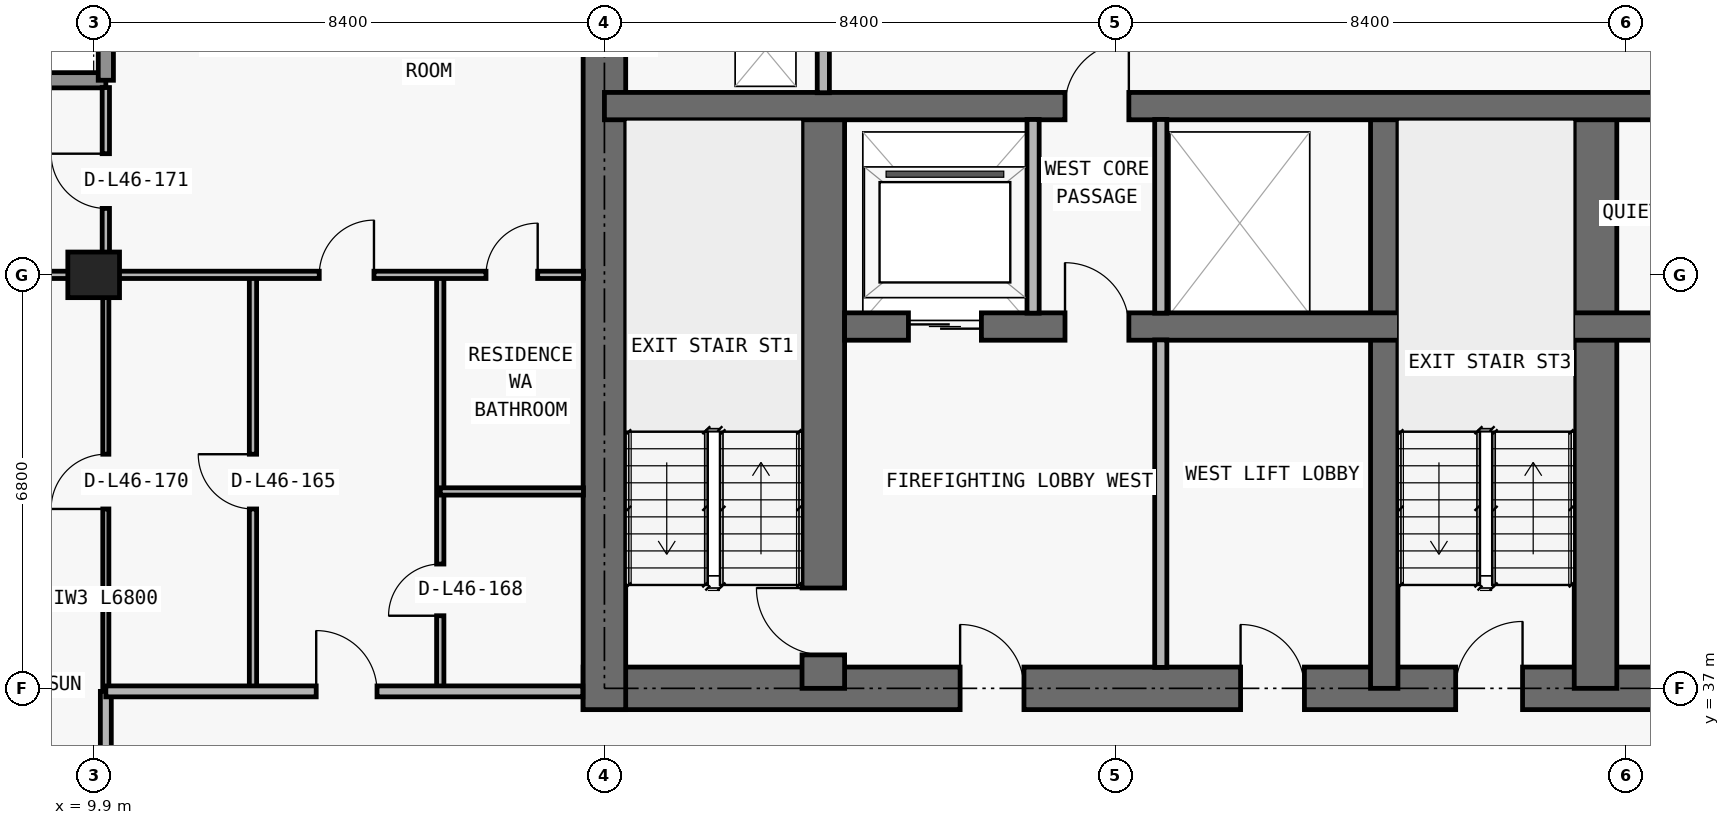
"""IFC4 building model, lengths in metres.
Left out: names, types, materials, properties, quantities, classifications, styles, units other than length and angle.
Written with IfcOpenShell. Run it as: python <this file> out.ifc"""

import sys

from ifc_helpers import new_model, si_unit, direction, frame, frame_2d, origin, origin_2d, place, context, subcontext, project, spatial, rectangle, extrude, element, fill, save


model = new_model("IFC4")
c1 = context("Model", 3, precision=1e-05, world=origin(), true_north=direction((0.0, 1.0)))
c2 = subcontext(c1, "Body", "Model", "MODEL_VIEW")
j1 = project(units=[si_unit("LENGTHUNIT", "METRE"), si_unit("PLANEANGLEUNIT", "RADIAN")], contexts=[c1])
p1 = place(None, origin())
s1 = spatial("IfcSite", under=j1, at=p1, CompositionType="ELEMENT")
p2 = place(p1, origin())
s2 = spatial("IfcBuilding", under=s1, at=p2, CompositionType="ELEMENT")
p3 = place(p2, frame((0.0, 0.0, 167.1)))
s3 = spatial("IfcBuildingStorey", under=s2, at=p3, CompositionType="ELEMENT", Elevation=167.1)
p4 = place(p3, frame((9.9, 43.8, 0.0), z_axis=(0.0, 0.0, 1.0), x_axis=(1.0, 0.0, 0.0)))
e1 = element("IfcColumn", 1, at=p4, inside=s3, PredefinedType="COLUMN", context=c2, shape_type="SweptSolid", body=[
    extrude(rectangle(XDim=0.85, YDim=0.75, at=origin_2d()), origin(), (0.0, 0.0, 1.0), 3.05),
])
p5 = place(p3, frame((17.95, 37.0, 0.0), z_axis=(0.0, 0.0, 1.0), x_axis=(1.0, 0.0, 0.0)))
e2 = element("IfcWall", 2, at=p5, inside=s3, PredefinedType="SHEAR", context=c2, shape_type="SweptSolid", body=[
    extrude(rectangle(XDim=41.9, YDim=0.7, at=frame_2d((20.95, 0.0))), origin(), (0.0, 0.0, 1.0), 3.05),
])
p6 = place(p5, frame((14.35, 0.0, 0.0)))
e3 = element("IfcOpeningElement", 3, at=p6, cuts=e2, PredefinedType="OPENING", context=c2, shape_type="SweptSolid", body=[
    extrude(rectangle(XDim=1.1, YDim=2.15, at=frame_2d((0.55, 1.075))), frame((0.0, 0.36, 0.0), z_axis=(0.0, -1.0, 0.0), x_axis=(1.0, 0.0, 0.0)), (0.0, 0.0, 1.0), 0.72),
])
p7 = place(p5, frame((6.2, 0.0, 0.0)))
e4 = element("IfcOpeningElement", 4, at=p7, cuts=e2, PredefinedType="OPENING", context=c2, shape_type="SweptSolid", body=[
    extrude(rectangle(XDim=1.05, YDim=2.15, at=frame_2d((0.525, 1.075))), frame((0.0, 0.36, 0.0), z_axis=(0.0, -1.0, 0.0), x_axis=(1.0, 0.0, 0.0)), (0.0, 0.0, 1.0), 0.72),
])
p8 = place(p5, frame((34.7, 0.0, 0.0)))
e5 = element("IfcOpeningElement", 5, at=p8, cuts=e2, PredefinedType="OPENING", context=c2, shape_type="SweptSolid", body=[
    extrude(rectangle(XDim=1.05, YDim=2.15, at=frame_2d((0.525, 1.075))), frame((0.0, 0.36, 0.0), z_axis=(0.0, -1.0, 0.0), x_axis=(1.0, 0.0, 0.0)), (0.0, 0.0, 1.0), 0.72),
])
p9 = place(p5, frame((10.812, 0.0, 0.0)))
e6 = element("IfcOpeningElement", 6, at=p9, cuts=e2, PredefinedType="OPENING", context=c2, shape_type="SweptSolid", body=[
    extrude(rectangle(XDim=1.05, YDim=2.15, at=frame_2d((0.525, 1.075))), frame((0.0, 0.36, 0.0), z_axis=(0.0, -1.0, 0.0), x_axis=(1.0, 0.0, 0.0)), (0.0, 0.0, 1.0), 0.72),
])
p10 = place(p5, frame((24.05, 0.0, 0.0)))
e7 = element("IfcOpeningElement", 7, at=p10, cuts=e2, PredefinedType="OPENING", context=c2, shape_type="SweptSolid", body=[
    extrude(rectangle(XDim=1.05, YDim=2.15, at=frame_2d((0.525, 1.075))), frame((0.0, 0.36, 0.0), z_axis=(0.0, -1.0, 0.0), x_axis=(1.0, 0.0, 0.0)), (0.0, 0.0, 1.0), 0.72),
])
p11 = place(p3, frame((18.3, 36.65, 0.0), z_axis=(0.0, 0.0, 1.0), x_axis=(0.0, 1.0, 0.0)))
e8 = element("IfcWall", 8, at=p11, inside=s3, PredefinedType="SHEAR", context=c2, shape_type="SweptSolid", body=[
    extrude(rectangle(XDim=13.95, YDim=0.7, at=frame_2d((6.975, 0.0))), origin(), (0.0, 0.0, 1.0), 3.05),
])
p12 = place(p3, frame((21.9, 37.0, 0.0), z_axis=(0.0, 0.0, 1.0), x_axis=(0.0, 1.0, 0.0)))
e9 = element("IfcWall", 9, at=p12, inside=s3, PredefinedType="SHEAR", context=c2, shape_type="SweptSolid", body=[
    extrude(rectangle(XDim=9.575, YDim=0.7, at=frame_2d((4.788, 0.0))), origin(), (0.0, 0.0, 1.0), 3.05),
])
p13 = place(p12, frame((0.55, 0.0, 0.0)))
e10 = element("IfcOpeningElement", 10, at=p13, cuts=e9, PredefinedType="OPENING", context=c2, shape_type="SweptSolid", body=[
    extrude(rectangle(XDim=1.1, YDim=2.15, at=frame_2d((0.55, 1.075))), frame((0.0, 0.36, 0.0), z_axis=(0.0, -1.0, 0.0), x_axis=(1.0, 0.0, 0.0)), (0.0, 0.0, 1.0), 0.72),
])
p14 = place(p3, frame((31.125, 37.0, 0.0), z_axis=(0.0, 0.0, 1.0), x_axis=(0.0, 1.0, 0.0)))
e11 = element("IfcWall", 11, at=p14, inside=s3, PredefinedType="SHEAR", context=c2, shape_type="SweptSolid", body=[
    extrude(rectangle(XDim=9.575, YDim=0.45, at=frame_2d((4.788, 0.0))), origin(), (0.0, 0.0, 1.0), 3.05),
])
p15 = place(p3, frame((34.6, 37.0, 0.0), z_axis=(0.0, 0.0, 1.0), x_axis=(0.0, 1.0, 0.0)))
e12 = element("IfcWall", 12, at=p15, inside=s3, PredefinedType="SHEAR", context=c2, shape_type="SweptSolid", body=[
    extrude(rectangle(XDim=9.575, YDim=0.7, at=frame_2d((4.788, 0.0))), origin(), (0.0, 0.0, 1.0), 3.05),
])
p16 = place(p3, frame((22.25, 42.95, 0.0), z_axis=(0.0, 0.0, 1.0), x_axis=(1.0, 0.0, 0.0)))
e13 = element("IfcWall", 13, at=p16, inside=s3, PredefinedType="SHEAR", context=c2, shape_type="SweptSolid", body=[
    extrude(rectangle(XDim=33.3, YDim=0.45, at=frame_2d((16.65, 0.0))), origin(), (0.0, 0.0, 1.0), 3.05),
])
p17 = place(p16, frame((1.05, 0.0, 0.0)))
e14 = element("IfcOpeningElement", 14, at=p17, cuts=e13, PredefinedType="OPENING", context=c2, shape_type="SweptSolid", body=[
    extrude(rectangle(XDim=1.2, YDim=2.2, at=frame_2d((0.6, 1.1))), frame((0.0, 0.235, 0.0), z_axis=(0.0, -1.0, 0.0), x_axis=(1.0, 0.0, 0.0)), (0.0, 0.0, 1.0), 0.47),
])
p18 = place(p16, frame((31.05, 0.0, 0.0)))
e15 = element("IfcOpeningElement", 15, at=p18, cuts=e13, PredefinedType="OPENING", context=c2, shape_type="SweptSolid", body=[
    extrude(rectangle(XDim=1.2, YDim=2.2, at=frame_2d((0.6, 1.1))), frame((0.0, 0.235, 0.0), z_axis=(0.0, -1.0, 0.0), x_axis=(1.0, 0.0, 0.0)), (0.0, 0.0, 1.0), 0.47),
])
p19 = place(p16, frame((21.4, 0.0, 0.0)))
e16 = element("IfcOpeningElement", 16, at=p19, cuts=e13, PredefinedType="OPENING", context=c2, shape_type="SweptSolid", body=[
    extrude(rectangle(XDim=1.1, YDim=2.2, at=frame_2d((0.55, 1.1))), frame((0.0, 0.235, 0.0), z_axis=(0.0, -1.0, 0.0), x_axis=(1.0, 0.0, 0.0)), (0.0, 0.0, 1.0), 0.47),
])
p20 = place(p16, frame((24.0, 0.0, 0.0)))
e17 = element("IfcOpeningElement", 17, at=p20, cuts=e13, PredefinedType="OPENING", context=c2, shape_type="SweptSolid", body=[
    extrude(rectangle(XDim=1.1, YDim=2.2, at=frame_2d((0.55, 1.1))), frame((0.0, 0.235, 0.0), z_axis=(0.0, -1.0, 0.0), x_axis=(1.0, 0.0, 0.0)), (0.0, 0.0, 1.0), 0.47),
])
p21 = place(p16, frame((3.625, 0.0, 0.0)))
e18 = element("IfcOpeningElement", 18, at=p21, cuts=e13, PredefinedType="OPENING", context=c2, shape_type="SweptSolid", body=[
    extrude(rectangle(XDim=1.05, YDim=2.15, at=frame_2d((0.525, 1.075))), frame((0.0, 0.235, 0.0), z_axis=(0.0, -1.0, 0.0), x_axis=(1.0, 0.0, 0.0)), (0.0, 0.0, 1.0), 0.47),
])
p22 = place(p16, frame((28.675, 0.0, 0.0)))
e19 = element("IfcOpeningElement", 19, at=p22, cuts=e13, PredefinedType="OPENING", context=c2, shape_type="SweptSolid", body=[
    extrude(rectangle(XDim=1.05, YDim=2.15, at=frame_2d((0.525, 1.075))), frame((0.0, 0.235, 0.0), z_axis=(0.0, -1.0, 0.0), x_axis=(1.0, 0.0, 0.0)), (0.0, 0.0, 1.0), 0.47),
])
p23 = place(p16, frame((15.975, 0.0, 0.0)))
e20 = element("IfcOpeningElement", 20, at=p23, cuts=e13, PredefinedType="OPENING", context=c2, shape_type="SweptSolid", body=[
    extrude(rectangle(XDim=1.0, YDim=2.2, at=frame_2d((0.5, 1.1))), frame((0.0, 0.235, 0.0), z_axis=(0.0, -1.0, 0.0), x_axis=(1.0, 0.0, 0.0)), (0.0, 0.0, 1.0), 0.47),
])
p24 = place(p3, frame((18.3, 46.575, 0.0), z_axis=(0.0, 0.0, 1.0), x_axis=(1.0, 0.0, 0.0)))
e21 = element("IfcWall", 21, at=p24, inside=s3, PredefinedType="SHEAR", context=c2, shape_type="SweptSolid", body=[
    extrude(rectangle(XDim=41.2, YDim=0.45, at=frame_2d((20.6, 0.0))), origin(), (0.0, 0.0, 1.0), 3.05),
])
p25 = place(p24, frame((7.575, 0.0, 0.0)))
e22 = element("IfcOpeningElement", 22, at=p25, cuts=e21, PredefinedType="OPENING", context=c2, shape_type="SweptSolid", body=[
    extrude(rectangle(XDim=1.05, YDim=2.15, at=frame_2d((0.525, 1.075))), frame((0.0, 0.235, 0.0), z_axis=(0.0, -1.0, 0.0), x_axis=(1.0, 0.0, 0.0)), (0.0, 0.0, 1.0), 0.47),
])
p26 = place(p24, frame((32.625, 0.0, 0.0)))
e23 = element("IfcOpeningElement", 23, at=p26, cuts=e21, PredefinedType="OPENING", context=c2, shape_type="SweptSolid", body=[
    extrude(rectangle(XDim=1.05, YDim=2.15, at=frame_2d((0.525, 1.075))), frame((0.0, 0.235, 0.0), z_axis=(0.0, -1.0, 0.0), x_axis=(1.0, 0.0, 0.0)), (0.0, 0.0, 1.0), 0.47),
])
p27 = place(p3, frame((6.25, 47.0, 0.0), z_axis=(0.0, 0.0, 1.0), x_axis=(1.0, 0.0, 0.0)))
e24 = element("IfcWall", 24, at=p27, inside=s3, PredefinedType="ELEMENTEDWALL", context=c2, shape_type="SweptSolid", body=[
    extrude(rectangle(XDim=3.85, YDim=0.25, at=frame_2d((1.925, 0.0))), origin(), (0.0, 0.0, 1.0), 3.05),
])
p28 = place(p3, frame((10.1, 47.0, 0.0), z_axis=(0.0, 0.0, 1.0), x_axis=(0.0, 1.0, 0.0)))
e25 = element("IfcWall", 25, at=p28, inside=s3, PredefinedType="ELEMENTEDWALL", context=c2, shape_type="SweptSolid", body=[
    extrude(rectangle(XDim=3.45, YDim=0.25, at=frame_2d((1.725, 0.0))), origin(), (0.0, 0.0, 1.0), 3.05),
])
p29 = place(p3, frame((10.1, 33.705, 0.0), z_axis=(0.0, 0.0, 1.0), x_axis=(0.0, 1.0, 0.0)))
e26 = element("IfcWall", 26, at=p29, inside=s3, PredefinedType="PARTITIONING", context=c2, shape_type="SweptSolid", body=[
    extrude(rectangle(XDim=3.245, YDim=0.18, at=frame_2d((1.623, 0.0))), origin(), (0.0, 0.0, 1.0), 2.263),
])
p30 = place(p3, frame((10.1, 37.0, 0.0), z_axis=(0.0, 0.0, 1.0), x_axis=(0.0, 1.0, 0.0)))
e27 = element("IfcWall", 27, at=p30, inside=s3, PredefinedType="MOVABLE", context=c2, shape_type="SweptSolid", body=[
    extrude(rectangle(XDim=6.8, YDim=0.1, at=frame_2d((3.4, 0.0))), origin(), (0.0, 0.0, 1.0), 2.263),
])
p31 = place(p30, frame((2.95, 0.0, 0.0)))
e28 = element("IfcOpeningElement", 28, at=p31, cuts=e27, PredefinedType="OPENING", context=c2, shape_type="SweptSolid", body=[
    extrude(rectangle(XDim=0.9, YDim=2.15, at=frame_2d((0.45, 1.075))), frame((0.0, 0.06, 0.0), z_axis=(0.0, -1.0, 0.0), x_axis=(1.0, 0.0, 0.0)), (0.0, 0.0, 1.0), 0.12),
])
p32 = place(p3, frame((10.1, 43.805, 0.0), z_axis=(0.0, 0.0, 1.0), x_axis=(0.0, 1.0, 0.0)))
e29 = element("IfcWall", 29, at=p32, inside=s3, PredefinedType="PARTITIONING", context=c2, shape_type="SweptSolid", body=[
    extrude(rectangle(XDim=3.075, YDim=0.12, at=frame_2d((1.538, 0.0))), origin(), (0.0, 0.0, 1.0), 3.05),
])
p33 = place(p32, frame((1.087, 0.0, 0.0)))
e30 = element("IfcOpeningElement", 30, at=p33, cuts=e29, PredefinedType="OPENING", context=c2, shape_type="SweptSolid", body=[
    extrude(rectangle(XDim=0.9, YDim=2.15, at=frame_2d((0.45, 1.075))), frame((0.0, 0.07, 0.0), z_axis=(0.0, -1.0, 0.0), x_axis=(1.0, 0.0, 0.0)), (0.0, 0.0, 1.0), 0.14),
])
p34 = place(p3, frame((12.52, 37.0, 0.0), z_axis=(0.0, 0.0, 1.0), x_axis=(0.0, 1.0, 0.0)))
e31 = element("IfcWall", 31, at=p34, inside=s3, PredefinedType="PARTITIONING", context=c2, shape_type="SweptSolid", body=[
    extrude(rectangle(XDim=6.8, YDim=0.12, at=frame_2d((3.4, 0.0))), origin(), (0.0, 0.0, 1.0), 3.05),
])
p35 = place(p34, frame((2.95, 0.0, 0.0)))
e32 = element("IfcOpeningElement", 32, at=p35, cuts=e31, PredefinedType="OPENING", context=c2, shape_type="SweptSolid", body=[
    extrude(rectangle(XDim=0.9, YDim=2.15, at=frame_2d((0.45, 1.075))), frame((0.0, 0.07, 0.0), z_axis=(0.0, -1.0, 0.0), x_axis=(1.0, 0.0, 0.0)), (0.0, 0.0, 1.0), 0.14),
])
p36 = place(p3, frame((15.6, 37.0, 0.0), z_axis=(0.0, 0.0, 1.0), x_axis=(0.0, 1.0, 0.0)))
e33 = element("IfcWall", 33, at=p36, inside=s3, PredefinedType="PARTITIONING", context=c2, shape_type="SweptSolid", body=[
    extrude(rectangle(XDim=6.8, YDim=0.12, at=frame_2d((3.4, 0.0))), origin(), (0.0, 0.0, 1.0), 3.05),
])
p37 = place(p36, frame((1.194, 0.0, 0.0)))
e34 = element("IfcOpeningElement", 34, at=p37, cuts=e33, PredefinedType="OPENING", context=c2, shape_type="SweptSolid", body=[
    extrude(rectangle(XDim=0.85, YDim=2.1, at=frame_2d((0.425, 1.05))), frame((0.0, 0.07, 0.0), z_axis=(0.0, -1.0, 0.0), x_axis=(1.0, 0.0, 0.0)), (0.0, 0.0, 1.0), 0.14),
])
p38 = place(p3, frame((21.9, 46.795, 0.0), z_axis=(0.0, 0.0, 1.0), x_axis=(0.0, 1.0, 0.0)))
e35 = element("IfcWall", 35, at=p38, inside=s3, PredefinedType="PARTITIONING", context=c2, shape_type="SweptSolid", body=[
    extrude(rectangle(XDim=3.16, YDim=0.2, at=frame_2d((1.58, 0.0))), origin(), (0.0, 0.0, 1.0), 3.05),
])
p39 = place(p3, frame((25.35, 43.17, 0.0), z_axis=(0.0, 0.0, 1.0), x_axis=(0.0, 1.0, 0.0)))
e36 = element("IfcWall", 36, at=p39, inside=s3, PredefinedType="PARTITIONING", context=c2, shape_type="SweptSolid", body=[
    extrude(rectangle(XDim=3.185, YDim=0.2, at=frame_2d((1.593, 0.0))), origin(), (0.0, 0.0, 1.0), 3.05),
])
p40 = place(p3, frame((27.45, 37.345, 0.0), z_axis=(0.0, 0.0, 1.0), x_axis=(0.0, 1.0, 0.0)))
e37 = element("IfcWall", 37, at=p40, inside=s3, PredefinedType="PARTITIONING", context=c2, shape_type="SweptSolid", body=[
    extrude(rectangle(XDim=5.385, YDim=0.2, at=frame_2d((2.692, 0.0))), origin(), (0.0, 0.0, 1.0), 3.05),
])
p41 = place(p3, frame((27.45, 43.17, 0.0), z_axis=(0.0, 0.0, 1.0), x_axis=(0.0, 1.0, 0.0)))
e38 = element("IfcWall", 38, at=p41, inside=s3, PredefinedType="PARTITIONING", context=c2, shape_type="SweptSolid", body=[
    extrude(rectangle(XDim=3.185, YDim=0.2, at=frame_2d((1.593, 0.0))), origin(), (0.0, 0.0, 1.0), 3.05),
])
p42 = place(p3, frame((10.1, 36.95, 0.0), z_axis=(0.0, 0.0, 1.0), x_axis=(1.0, 0.0, 0.0)))
e39 = element("IfcWall", 39, at=p42, inside=s3, PredefinedType="PARTITIONING", context=c2, shape_type="SweptSolid", body=[
    extrude(rectangle(XDim=7.845, YDim=0.18, at=frame_2d((3.922, 0.0))), origin(), (0.0, 0.0, 1.0), 3.05),
])
p43 = place(p42, frame((3.46, 0.0, 0.0)))
e40 = element("IfcOpeningElement", 40, at=p43, cuts=e39, PredefinedType="OPENING", context=c2, shape_type="SweptSolid", body=[
    extrude(rectangle(XDim=1.0, YDim=2.2, at=frame_2d((0.5, 1.1))), frame((0.0, 0.1, 0.0), z_axis=(0.0, -1.0, 0.0), x_axis=(1.0, 0.0, 0.0)), (0.0, 0.0, 1.0), 0.2),
])
p44 = place(p3, frame((15.6, 40.238, 0.0), z_axis=(0.0, 0.0, 1.0), x_axis=(1.0, 0.0, 0.0)))
e41 = element("IfcWall", 41, at=p44, inside=s3, PredefinedType="PARTITIONING", context=c2, shape_type="SweptSolid", body=[
    extrude(rectangle(XDim=2.355, YDim=0.12, at=frame_2d((1.177, 0.0))), origin(), (0.0, 0.0, 1.0), 3.05),
])
p45 = place(p3, frame((6.395, 43.8, 0.0), z_axis=(0.0, 0.0, 1.0), x_axis=(1.0, 0.0, 0.0)))
e42 = element("IfcWall", 42, at=p45, inside=s3, PredefinedType="PARTITIONING", context=c2, shape_type="SweptSolid", body=[
    extrude(rectangle(XDim=11.56, YDim=0.12, at=frame_2d((5.78, 0.0))), origin(), (0.0, 0.0, 1.0), 2.418),
])
p46 = place(p45, frame((7.215, 0.0, 0.0)))
e43 = element("IfcOpeningElement", 43, at=p46, cuts=e42, PredefinedType="OPENING", context=c2, shape_type="SweptSolid", body=[
    extrude(rectangle(XDim=0.9, YDim=2.15, at=frame_2d((0.45, 1.075))), frame((0.0, 0.07, 0.0), z_axis=(0.0, -1.0, 0.0), x_axis=(1.0, 0.0, 0.0)), (0.0, 0.0, 1.0), 0.14),
])
p47 = place(p45, frame((9.958, 0.0, 0.0)))
e44 = element("IfcOpeningElement", 44, at=p47, cuts=e42, PredefinedType="OPENING", context=c2, shape_type="SweptSolid", body=[
    extrude(rectangle(XDim=0.85, YDim=2.1, at=frame_2d((0.425, 1.05))), frame((0.0, 0.07, 0.0), z_axis=(0.0, -1.0, 0.0), x_axis=(1.0, 0.0, 0.0)), (0.0, 0.0, 1.0), 0.14),
])
p48 = place(p17, origin())
e45 = element("IfcDoor", 45, at=p48, inside=s3, OperationType="DOUBLE_DOOR_SLIDING", PredefinedType="DOOR", context=c2, shape_type="SweptSolid", body=[
    extrude(rectangle(XDim=1.2, YDim=2.2, at=frame_2d((0.6, 1.1))), frame((0.0, 0.025, 0.0), z_axis=(0.0, -1.0, 0.0), x_axis=(1.0, 0.0, 0.0)), (0.0, 0.0, 1.0), 0.05),
])
fill(e14, e45)
p49 = place(p6, origin())
e46 = element("IfcDoor", 46, at=p49, inside=s3, OperationType="SINGLE_SWING_RIGHT", PredefinedType="DOOR", context=c2, shape_type="SweptSolid", body=[
    extrude(rectangle(XDim=1.1, YDim=2.15, at=frame_2d((0.55, 1.075))), frame((0.0, 0.025, 0.0), z_axis=(0.0, -1.0, 0.0), x_axis=(1.0, 0.0, 0.0)), (0.0, 0.0, 1.0), 0.05),
])
fill(e3, e46)
p50 = place(p7, origin())
e47 = element("IfcDoor", 47, at=p50, inside=s3, OperationType="SINGLE_SWING_LEFT", PredefinedType="DOOR", context=c2, shape_type="SweptSolid", body=[
    extrude(rectangle(XDim=1.05, YDim=2.15, at=frame_2d((0.525, 1.075))), frame((0.0, 0.025, 0.0), z_axis=(0.0, -1.0, 0.0), x_axis=(1.0, 0.0, 0.0)), (0.0, 0.0, 1.0), 0.05),
])
fill(e4, e47)
p51 = place(p13, origin())
e48 = element("IfcDoor", 48, at=p51, inside=s3, OperationType="SINGLE_SWING_RIGHT", PredefinedType="DOOR", context=c2, shape_type="SweptSolid", body=[
    extrude(rectangle(XDim=1.1, YDim=2.15, at=frame_2d((0.55, 1.075))), frame((0.0, 0.025, 0.0), z_axis=(0.0, -1.0, 0.0), x_axis=(1.0, 0.0, 0.0)), (0.0, 0.0, 1.0), 0.05),
])
fill(e10, e48)
p52 = place(p21, origin())
e49 = element("IfcDoor", 49, at=p52, inside=s3, OperationType="SINGLE_SWING_LEFT", PredefinedType="DOOR", context=c2, shape_type="SweptSolid", body=[
    extrude(rectangle(XDim=1.05, YDim=2.15, at=frame_2d((0.525, 1.075))), frame((0.0, 0.025, 0.0), z_axis=(0.0, -1.0, 0.0), x_axis=(1.0, 0.0, 0.0)), (0.0, 0.0, 1.0), 0.05),
])
fill(e18, e49)
p53 = place(p9, origin())
e50 = element("IfcDoor", 50, at=p53, inside=s3, OperationType="SINGLE_SWING_LEFT", PredefinedType="DOOR", context=c2, shape_type="SweptSolid", body=[
    extrude(rectangle(XDim=1.05, YDim=2.15, at=frame_2d((0.525, 1.075))), frame((0.0, 0.025, 0.0), z_axis=(0.0, -1.0, 0.0), x_axis=(1.0, 0.0, 0.0)), (0.0, 0.0, 1.0), 0.05),
])
fill(e6, e50)
p54 = place(p25, origin())
e51 = element("IfcDoor", 51, at=p54, inside=s3, OperationType="SINGLE_SWING_RIGHT", PredefinedType="DOOR", context=c2, shape_type="SweptSolid", body=[
    extrude(rectangle(XDim=1.05, YDim=2.15, at=frame_2d((0.525, 1.075))), frame((0.0, 0.025, 0.0), z_axis=(0.0, -1.0, 0.0), x_axis=(1.0, 0.0, 0.0)), (0.0, 0.0, 1.0), 0.05),
])
fill(e22, e51)
p55 = place(p35, origin())
e52 = element("IfcDoor", 52, at=p55, inside=s3, OperationType="SINGLE_SWING_RIGHT", PredefinedType="DOOR", context=c2, shape_type="SweptSolid", body=[
    extrude(rectangle(XDim=0.9, YDim=2.15, at=frame_2d((0.45, 1.075))), frame((0.0, 0.025, 0.0), z_axis=(0.0, -1.0, 0.0), x_axis=(1.0, 0.0, 0.0)), (0.0, 0.0, 1.0), 0.05),
])
fill(e32, e52)
p56 = place(p43, origin())
e53 = element("IfcDoor", 53, at=p56, inside=s3, OperationType="SINGLE_SWING_LEFT", PredefinedType="DOOR", context=c2, shape_type="SweptSolid", body=[
    extrude(rectangle(XDim=1.0, YDim=2.2, at=frame_2d((0.5, 1.1))), frame((0.0, 0.025, 0.0), z_axis=(0.0, -1.0, 0.0), x_axis=(1.0, 0.0, 0.0)), (0.0, 0.0, 1.0), 0.05),
])
fill(e40, e53)
p57 = place(p46, origin())
e54 = element("IfcDoor", 54, at=p57, inside=s3, OperationType="SINGLE_SWING_RIGHT", PredefinedType="DOOR", context=c2, shape_type="SweptSolid", body=[
    extrude(rectangle(XDim=0.9, YDim=2.15, at=frame_2d((0.45, 1.075))), frame((0.0, 0.025, 0.0), z_axis=(0.0, -1.0, 0.0), x_axis=(1.0, 0.0, 0.0)), (0.0, 0.0, 1.0), 0.05),
])
fill(e43, e54)
p58 = place(p37, origin())
e55 = element("IfcDoor", 55, at=p58, inside=s3, OperationType="SINGLE_SWING_LEFT", PredefinedType="DOOR", context=c2, shape_type="SweptSolid", body=[
    extrude(rectangle(XDim=0.85, YDim=2.1, at=frame_2d((0.425, 1.05))), frame((0.0, 0.025, 0.0), z_axis=(0.0, -1.0, 0.0), x_axis=(1.0, 0.0, 0.0)), (0.0, 0.0, 1.0), 0.05),
])
fill(e34, e55)
p59 = place(p47, origin())
e56 = element("IfcDoor", 56, at=p59, inside=s3, OperationType="SINGLE_SWING_RIGHT", PredefinedType="DOOR", context=c2, shape_type="SweptSolid", body=[
    extrude(rectangle(XDim=0.85, YDim=2.1, at=frame_2d((0.425, 1.05))), frame((0.0, 0.025, 0.0), z_axis=(0.0, -1.0, 0.0), x_axis=(1.0, 0.0, 0.0)), (0.0, 0.0, 1.0), 0.05),
])
fill(e44, e56)
p60 = place(p31, origin())
e57 = element("IfcDoor", 57, at=p60, inside=s3, OperationType="SINGLE_SWING_LEFT", PredefinedType="DOOR", context=c2, shape_type="SweptSolid", body=[
    extrude(rectangle(XDim=0.9, YDim=2.15, at=frame_2d((0.45, 1.075))), frame((0.0, 0.025, 0.0), z_axis=(0.0, -1.0, 0.0), x_axis=(1.0, 0.0, 0.0)), (0.0, 0.0, 1.0), 0.05),
])
fill(e28, e57)
p61 = place(p33, origin())
e58 = element("IfcDoor", 58, at=p61, inside=s3, OperationType="SINGLE_SWING_RIGHT", PredefinedType="DOOR", context=c2, shape_type="SweptSolid", body=[
    extrude(rectangle(XDim=0.9, YDim=2.15, at=frame_2d((0.45, 1.075))), frame((0.0, 0.025, 0.0), z_axis=(0.0, -1.0, 0.0), x_axis=(1.0, 0.0, 0.0)), (0.0, 0.0, 1.0), 0.05),
])
fill(e30, e58)
save(model, sys.argv[1])
